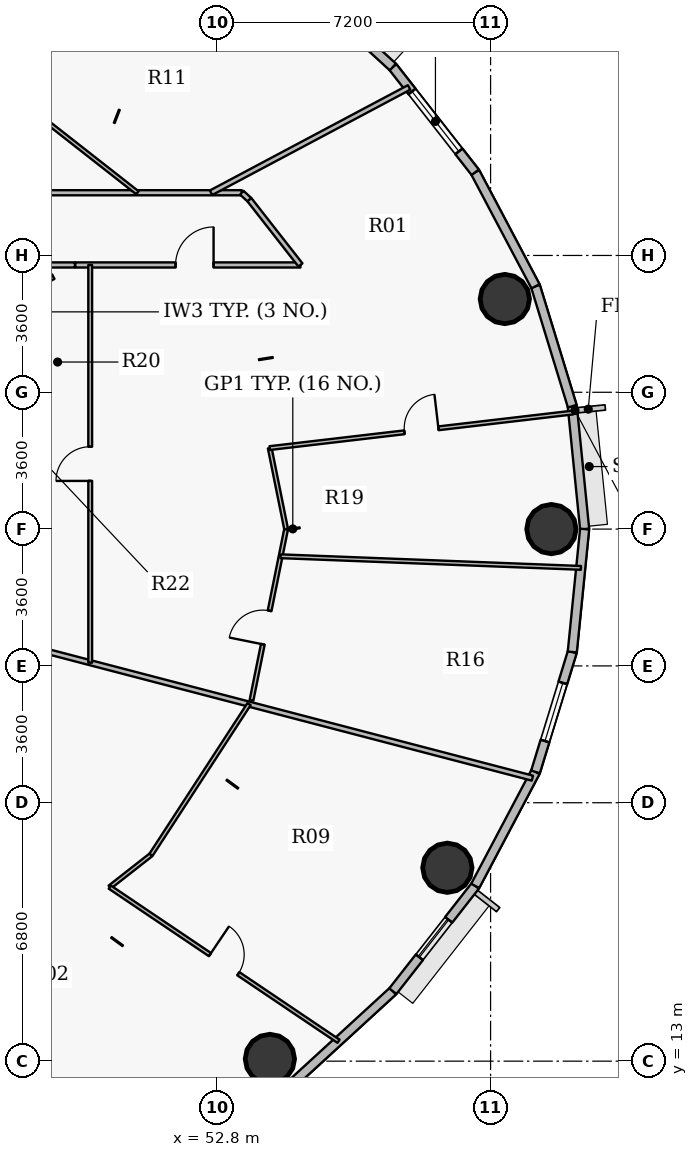
"""IFC4 building model, lengths in metres.
Left out: names, types, materials, properties, quantities, classifications, styles, units other than length and angle.
Written with IfcOpenShell. Run it as: python <this file> out.ifc"""

import sys

from ifc_helpers import new_model, si_unit, direction, frame, frame_2d, origin, origin_2d, place, context, subcontext, project, spatial, rectangle, hollow_circle, extrude, source, transform, mapped, element, fill, save


model = new_model("IFC4")
c1 = context("Model", 3, precision=1e-05, world=origin(), true_north=direction((0.0, 1.0)))
c2 = subcontext(c1, "Body", "Model", "MODEL_VIEW")
j1 = project(units=[si_unit("LENGTHUNIT", "METRE"), si_unit("PLANEANGLEUNIT", "RADIAN")], contexts=[c1])
p1 = place(None, origin())
s1 = spatial("IfcSite", under=j1, at=p1, CompositionType="ELEMENT")
p2 = place(p1, origin())
s2 = spatial("IfcBuilding", under=s1, at=p2, CompositionType="ELEMENT")
p3 = place(p2, frame((0.0, 0.0, 174.9)))
s3 = spatial("IfcBuildingStorey", under=s2, at=p3, CompositionType="ELEMENT", Elevation=174.9)
for number, where, z_axis, x_axis in (
    (1, (61.6, 27.0, 0.0), (0.0, 0.0, 1.0), (1.0, 0.0, 0.0)),
    (2, (60.375, 33.053, 0.0), (0.0, 0.0, 1.0), (1.0, 0.0, 0.0)),
    (3, (54.192, 13.058, 0.0), (0.0, 0.0, 1.0), (1.0, 0.0, 0.0)),
    (4, (58.863, 18.089, 0.0), (0.0, 0.0, 1.0), (1.0, 0.0, 0.0)),
):
    element("IfcColumn", number, at=place(p3, frame(where, z_axis=z_axis, x_axis=x_axis)), inside=s3, PredefinedType="COLUMN", context=c2, shape_type="SweptSolid", body=[
        extrude(hollow_circle(Radius=0.65, WallThickness=0.04, at=origin_2d()), origin(), (0.0, 0.0, 1.0), 3.75),
    ])
p4 = place(p3, frame((62.15, 30.234, 0.0), z_axis=(0.0, 0.0, 1.0), x_axis=(0.100061534614, -0.994981250723, 0.0)))
e5 = element("IfcWall", 5, at=p4, inside=s3, PredefinedType="SOLIDWALL", context=c2, shape_type="SweptSolid", body=[
    extrude(rectangle(XDim=3.25, YDim=0.24, at=frame_2d((1.625, 0.0))), origin(), (0.0, 0.0, 1.0), 3.5),
])
p5 = place(p3, frame((61.183, 33.389, 0.0), z_axis=(0.0, 0.0, 1.0), x_axis=(0.293097995113, -0.956082405058, 0.0)))
e6 = element("IfcWall", 6, at=p5, inside=s3, PredefinedType="SOLIDWALL", context=c2, shape_type="SweptSolid", body=[
    extrude(rectangle(XDim=3.3, YDim=0.24, at=frame_2d((1.65, 0.0))), origin(), (0.0, 0.0, 1.0), 3.5),
])
p6 = place(p3, frame((59.596, 36.388, 0.0), z_axis=(0.0, 0.0, 1.0), x_axis=(0.467586874938, -0.88394712194, 0.0)))
e7 = element("IfcWall", 7, at=p6, inside=s3, PredefinedType="SOLIDWALL", context=c2, shape_type="SweptSolid", body=[
    extrude(rectangle(XDim=3.393, YDim=0.24, at=frame_2d((1.697, 0.0))), origin(), (0.0, 0.0, 1.0), 3.5),
])
p7 = place(p3, frame((57.428, 39.158, 0.0), z_axis=(0.0, 0.0, 1.0), x_axis=(0.616287674549, -0.787521112224, 0.0)))
e8 = element("IfcWall", 8, at=p7, inside=s3, PredefinedType="SOLIDWALL", context=c2, shape_type="SweptSolid", body=[
    extrude(rectangle(XDim=3.517, YDim=0.24, at=frame_2d((1.759, 0.0))), origin(), (0.0, 0.0, 1.0), 3.5),
])
p8 = place(p7, frame((0.819, 0.0, 0.9)))
e9 = element("IfcOpeningElement", 9, at=p8, cuts=e8, PredefinedType="OPENING", context=c2, shape_type="SweptSolid", body=[
    extrude(rectangle(XDim=2.0, YDim=1.75, at=origin_2d()), frame((1.0, 0.13, 0.875), z_axis=(0.0, -1.0, 0.0), x_axis=(1.0, 0.0, 0.0)), (0.0, 0.0, 1.0), 0.26),
])
for number, where, z_axis, x_axis in (
    (10, (54.732, 41.631, 0.0), (0.0, 0.0, 1.0), (0.737, -0.676, 0.0)),
    (11, (57.428, 14.842, 0.0), (0.0, 0.0, 1.0), (-0.737, -0.676, 0.0)),
):
    element("IfcWall", number, at=place(p3, frame(where, z_axis=z_axis, x_axis=x_axis)), inside=s3, PredefinedType="SOLIDWALL", context=c2, shape_type="SweptSolid", body=[
        extrude(rectangle(XDim=3.658, YDim=0.24, at=frame_2d((1.829, 0.0))), origin(), (0.0, 0.0, 1.0), 3.5),
    ])
p9 = place(p3, frame((59.596, 17.612, 0.0), z_axis=(0.0, 0.0, 1.0), x_axis=(-0.616287674549, -0.787521112224, 0.0)))
e12 = element("IfcWall", 12, at=p9, inside=s3, PredefinedType="SOLIDWALL", context=c2, shape_type="SweptSolid", body=[
    extrude(rectangle(XDim=3.517, YDim=0.24, at=frame_2d((1.759, 0.0))), origin(), (0.0, 0.0, 1.0), 3.5),
])
p10 = place(p9, frame((1.134, 0.0, 0.9)))
e13 = element("IfcOpeningElement", 13, at=p10, cuts=e12, PredefinedType="OPENING", context=c2, shape_type="SweptSolid", body=[
    extrude(rectangle(XDim=1.25, YDim=1.65, at=origin_2d()), frame((0.625, 0.13, 0.825), z_axis=(0.0, -1.0, 0.0), x_axis=(1.0, 0.0, 0.0)), (0.0, 0.0, 1.0), 0.26),
])
p11 = place(p3, frame((61.183, 20.611, 0.0), z_axis=(0.0, 0.0, 1.0), x_axis=(-0.467586874938, -0.88394712194, 0.0)))
e14 = element("IfcWall", 14, at=p11, inside=s3, PredefinedType="SOLIDWALL", context=c2, shape_type="SweptSolid", body=[
    extrude(rectangle(XDim=3.393, YDim=0.24, at=frame_2d((1.697, 0.0))), origin(), (0.0, 0.0, 1.0), 3.5),
])
p12 = place(p3, frame((62.15, 23.766, 0.0), z_axis=(0.0, 0.0, 1.0), x_axis=(-0.293097995113, -0.956082405058, 0.0)))
e15 = element("IfcWall", 15, at=p12, inside=s3, PredefinedType="SOLIDWALL", context=c2, shape_type="SweptSolid", body=[
    extrude(rectangle(XDim=3.3, YDim=0.24, at=frame_2d((1.65, 0.0))), origin(), (0.0, 0.0, 1.0), 3.5),
])
p13 = place(p12, frame((0.85, 0.0, 0.9)))
e16 = element("IfcOpeningElement", 16, at=p13, cuts=e15, PredefinedType="OPENING", context=c2, shape_type="SweptSolid", body=[
    extrude(rectangle(XDim=1.6, YDim=1.75, at=origin_2d()), frame((0.8, 0.13, 0.875), z_axis=(0.0, -1.0, 0.0), x_axis=(1.0, 0.0, 0.0)), (0.0, 0.0, 1.0), 0.26),
])
p14 = place(p3, frame((62.475, 27.0, 0.0), z_axis=(0.0, 0.0, 1.0), x_axis=(-0.100061534614, -0.994981250723, 0.0)))
e17 = element("IfcWall", 17, at=p14, inside=s3, PredefinedType="SOLIDWALL", context=c2, shape_type="SweptSolid", body=[
    extrude(rectangle(XDim=3.25, YDim=0.24, at=frame_2d((1.625, 0.0))), origin(), (0.0, 0.0, 1.0), 3.5),
])
p15 = place(p3, frame((38.541, 35.85, 0.0), z_axis=(0.0, 0.0, 1.0), x_axis=(1.0, 0.0, 0.0)))
e18 = element("IfcWall", 18, at=p15, inside=s3, PredefinedType="PARTITIONING", context=c2, shape_type="SweptSolid", body=[
    extrude(rectangle(XDim=14.913, YDim=0.135, at=frame_2d((7.456, 0.0))), origin(), (0.0, 0.0, 1.0), 2.935),
])
p16 = place(p15, frame((5.868, 0.0, 0.0)))
e19 = element("IfcOpeningElement", 19, at=p16, cuts=e18, PredefinedType="OPENING", context=c2, shape_type="SweptSolid", body=[
    extrude(rectangle(XDim=1.0, YDim=2.15, at=origin_2d()), frame((0.5, 0.078, 1.075), z_axis=(0.0, -1.0, 0.0), x_axis=(1.0, 0.0, 0.0)), (0.0, 0.0, 1.0), 0.155),
])
p17 = place(p3, frame((45.282, 14.54, 0.0), z_axis=(0.0, 0.0, 1.0), x_axis=(0.597407497301, -0.801937829366, 0.0)))
e20 = element("IfcWall", 20, at=p17, inside=s3, PredefinedType="PARTITIONING", context=c2, shape_type="SweptSolid", body=[
    extrude(rectangle(XDim=6.713, YDim=0.1, at=frame_2d((3.356, 0.0))), origin(), (0.0, 0.0, 1.0), 2.935),
])
p18 = place(p17, frame((2.906, 0.0, 0.0)))
e21 = element("IfcOpeningElement", 21, at=p18, cuts=e20, PredefinedType="OPENING", context=c2, shape_type="SweptSolid", body=[
    extrude(rectangle(XDim=0.9, YDim=2.1, at=origin_2d()), frame((0.45, 0.06, 1.05), z_axis=(0.0, -1.0, 0.0), x_axis=(1.0, 0.0, 0.0)), (0.0, 0.0, 1.0), 0.12),
])
p19 = place(p3, frame((46.346, 39.035, 0.0), z_axis=(0.0, 0.0, 1.0), x_axis=(0.651891052095, 0.758312637504, 0.0)))
e22 = element("IfcWall", 22, at=p19, inside=s3, PredefinedType="PARTITIONING", context=c2, shape_type="SweptSolid", body=[
    extrude(rectangle(XDim=6.742, YDim=0.1, at=frame_2d((3.371, 0.0))), origin(), (0.0, 0.0, 1.0), 2.935),
])
p20 = place(p19, frame((2.921, 0.0, 0.0)))
e23 = element("IfcOpeningElement", 23, at=p20, cuts=e22, PredefinedType="OPENING", context=c2, shape_type="SweptSolid", body=[
    extrude(rectangle(XDim=0.9, YDim=2.1, at=origin_2d()), frame((0.45, 0.06, 1.05), z_axis=(0.0, -1.0, 0.0), x_axis=(1.0, 0.0, 0.0)), (0.0, 0.0, 1.0), 0.12),
])
p21 = place(p3, frame((46.945, 38.796, 0.0), z_axis=(0.0, 0.0, 1.0), x_axis=(0.787326008068, -0.616536906454, 0.0)))
e24 = element("IfcWall", 24, at=p21, inside=s3, PredefinedType="PARTITIONING", context=c2, shape_type="SweptSolid", body=[
    extrude(rectangle(XDim=4.779, YDim=0.1, at=frame_2d((2.389, 0.0))), origin(), (0.0, 0.0, 1.0), 2.935),
])
p22 = place(p3, frame((47.09, 24.105, 0.0), z_axis=(0.0, 0.0, 1.0), x_axis=(0.967573213792, -0.252590728159, 0.0)))
e25 = element("IfcWall", 25, at=p22, inside=s3, PredefinedType="PARTITIONING", context=c2, shape_type="SweptSolid", body=[
    extrude(rectangle(XDim=14.481, YDim=0.135, at=frame_2d((7.24, 0.0))), origin(), (0.0, 0.0, 1.0), 2.935),
])
p23 = place(p3, frame((49.071, 33.95, 0.0), z_axis=(0.0, 0.0, 1.0), x_axis=(1.0, 0.0, 0.0)))
e26 = element("IfcWall", 26, at=p23, inside=s3, PredefinedType="PARTITIONING", context=c2, shape_type="SweptSolid", body=[
    extrude(rectangle(XDim=5.926, YDim=0.135, at=frame_2d((2.963, 0.0))), origin(), (0.0, 0.0, 1.0), 3.5),
])
p24 = place(p23, frame((2.64, 0.0, 0.0)))
e27 = element("IfcOpeningElement", 27, at=p24, cuts=e26, PredefinedType="OPENING", context=c2, shape_type="SweptSolid", body=[
    extrude(rectangle(XDim=1.0, YDim=2.15, at=origin_2d()), frame((0.5, 0.078, 1.075), z_axis=(0.0, -1.0, 0.0), x_axis=(1.0, 0.0, 0.0)), (0.0, 0.0, 1.0), 0.155),
])
p25 = place(p3, frame((49.464, 23.485, 0.0), z_axis=(0.0, 0.0, 1.0), x_axis=(0.0, 1.0, 0.0)))
e28 = element("IfcWall", 28, at=p25, inside=s3, PredefinedType="PARTITIONING", context=c2, shape_type="SweptSolid", body=[
    extrude(rectangle(XDim=10.465, YDim=0.1, at=frame_2d((5.232, 0.0))), origin(), (0.0, 0.0, 1.0), 2.935),
])
p26 = place(p25, frame((4.783, 0.0, 0.0)))
e29 = element("IfcOpeningElement", 29, at=p26, cuts=e28, PredefinedType="OPENING", context=c2, shape_type="SweptSolid", body=[
    extrude(rectangle(XDim=0.9, YDim=2.1, at=origin_2d()), frame((0.45, 0.06, 1.05), z_axis=(0.0, -1.0, 0.0), x_axis=(1.0, 0.0, 0.0)), (0.0, 0.0, 1.0), 0.12),
])
p27 = place(p3, frame((49.979, 17.58, 0.0), z_axis=(0.0, 0.0, 1.0), x_axis=(0.787344176355, 0.6165137046, 0.0)))
e30 = element("IfcWall", 30, at=p27, inside=s3, PredefinedType="PARTITIONING", context=c2, shape_type="SweptSolid", body=[
    extrude(rectangle(XDim=1.378, YDim=0.1, at=frame_2d((0.689, 0.0))), origin(), (0.0, 0.0, 1.0), 3.5),
])
p28 = place(p3, frame((49.979, 17.58, 0.0), z_axis=(0.0, 0.0, 1.0), x_axis=(0.829313188428, -0.55878406876, 0.0)))
e31 = element("IfcWall", 31, at=p28, inside=s3, PredefinedType="PARTITIONING", context=c2, shape_type="SweptSolid", body=[
    extrude(rectangle(XDim=7.259, YDim=0.1, at=frame_2d((3.629, 0.0))), origin(), (0.0, 0.0, 1.0), 2.935),
])
p29 = place(p28, frame((3.179, 0.0, 0.0)))
e32 = element("IfcOpeningElement", 32, at=p29, cuts=e31, PredefinedType="OPENING", context=c2, shape_type="SweptSolid", body=[
    extrude(rectangle(XDim=0.9, YDim=2.1, at=origin_2d()), frame((0.45, 0.06, 1.05), z_axis=(0.0, -1.0, 0.0), x_axis=(1.0, 0.0, 0.0)), (0.0, 0.0, 1.0), 0.12),
])
p30 = place(p3, frame((51.064, 18.429, 0.0), z_axis=(0.0, 0.0, 1.0), x_axis=(0.545362062942, 0.838200584767, 0.0)))
e33 = element("IfcWall", 33, at=p30, inside=s3, PredefinedType="PARTITIONING", context=c2, shape_type="SweptSolid", body=[
    extrude(rectangle(XDim=4.729, YDim=0.1, at=frame_2d((2.365, 0.0))), origin(), (0.0, 0.0, 1.0), 2.935),
])
p31 = place(p3, frame((52.645, 35.85, 0.0), z_axis=(0.0, 0.0, 1.0), x_axis=(0.882944268091, 0.469477815712, 0.0)))
e34 = element("IfcWall", 34, at=p31, inside=s3, PredefinedType="PARTITIONING", context=c2, shape_type="SweptSolid", body=[
    extrude(rectangle(XDim=5.902, YDim=0.135, at=frame_2d((2.951, 0.0))), origin(), (0.0, 0.0, 1.0), 2.935),
])
p32 = place(p3, frame((53.454, 35.85, 0.0), z_axis=(0.0, 0.0, 1.0), x_axis=(0.736667385572, -0.676255249913, 0.0)))
e35 = element("IfcWall", 35, at=p32, inside=s3, PredefinedType="PARTITIONING", context=c2, shape_type="SweptSolid", body=[
    extrude(rectangle(XDim=0.271, YDim=0.135, at=frame_2d((0.135, 0.0))), origin(), (0.0, 0.0, 1.0), 3.5),
])
p33 = place(p3, frame((53.653, 35.667, 0.0), z_axis=(0.0, 0.0, 1.0), x_axis=(0.616302223209, -0.787509726713, 0.0)))
e36 = element("IfcWall", 36, at=p33, inside=s3, PredefinedType="PARTITIONING", context=c2, shape_type="SweptSolid", body=[
    extrude(rectangle(XDim=2.18, YDim=0.135, at=frame_2d((1.09, 0.0))), origin(), (0.0, 0.0, 1.0), 3.5),
])
p34 = place(p3, frame((53.709, 22.494, 0.0), z_axis=(0.0, 0.0, 1.0), x_axis=(0.198239863178, 0.980153537282, 0.0)))
e37 = element("IfcWall", 37, at=p34, inside=s3, PredefinedType="PARTITIONING", context=c2, shape_type="SweptSolid", body=[
    extrude(rectangle(XDim=4.597, YDim=0.1, at=frame_2d((2.299, 0.0))), origin(), (0.0, 0.0, 1.0), 2.935),
])
p35 = place(p34, frame((1.504, 0.0, 0.0)))
e38 = element("IfcOpeningElement", 38, at=p35, cuts=e37, PredefinedType="OPENING", context=c2, shape_type="SweptSolid", body=[
    extrude(rectangle(XDim=0.9, YDim=2.1, at=origin_2d()), frame((0.45, 0.06, 1.05), z_axis=(0.0, -1.0, 0.0), x_axis=(1.0, 0.0, 0.0)), (0.0, 0.0, 1.0), 0.12),
])
p36 = place(p3, frame((54.189, 29.132, 0.0), z_axis=(0.0, 0.0, 1.0), x_axis=(0.198252946245, -0.98015089109, 0.0)))
e39 = element("IfcWall", 39, at=p36, inside=s3, PredefinedType="PARTITIONING", context=c2, shape_type="SweptSolid", body=[
    extrude(rectangle(XDim=2.175, YDim=0.1, at=frame_2d((1.087, 0.0))), origin(), (0.0, 0.0, 1.0), 2.935),
])
p37 = place(p3, frame((54.189, 29.132, 0.0), z_axis=(0.0, 0.0, 1.0), x_axis=(0.993202342674, 0.116400629328, 0.0)))
e40 = element("IfcWall", 40, at=p37, inside=s3, PredefinedType="PARTITIONING", context=c2, shape_type="SweptSolid", body=[
    extrude(rectangle(XDim=8.037, YDim=0.1, at=frame_2d((4.019, 0.0))), origin(), (0.0, 0.0, 1.0), 2.935),
])
p38 = place(p37, frame((3.569, 0.0, 0.0)))
e41 = element("IfcOpeningElement", 41, at=p38, cuts=e40, PredefinedType="OPENING", context=c2, shape_type="SweptSolid", body=[
    extrude(rectangle(XDim=0.9, YDim=2.1, at=origin_2d()), frame((0.45, 0.06, 1.05), z_axis=(0.0, -1.0, 0.0), x_axis=(1.0, 0.0, 0.0)), (0.0, 0.0, 1.0), 0.12),
])
p39 = place(p3, frame((54.475, 26.285, 0.0), z_axis=(0.0, 0.0, 1.0), x_axis=(0.999251521297, -0.03868329336, 0.0)))
e42 = element("IfcWall", 42, at=p39, inside=s3, PredefinedType="PARTITIONING", context=c2, shape_type="SweptSolid", body=[
    extrude(rectangle(XDim=7.908, YDim=0.1, at=frame_2d((3.954, 0.0))), origin(), (0.0, 0.0, 1.0), 2.935),
])
p40 = place(p3, frame((49.061, 33.95, 0.0), z_axis=(0.0, 0.0, 1.0), x_axis=(-1.0, 0.0, 0.0)))
e43 = element("IfcWall", 43, at=p40, inside=s3, PredefinedType="PARTITIONING", context=c2, shape_type="SweptSolid", body=[
    extrude(rectangle(XDim=3.261, YDim=0.135, at=frame_2d((1.63, 0.0))), origin(), (0.0, 0.0, 1.0), 3.5),
])
p41 = place(p3, frame((47.749, 33.247, 0.0), z_axis=(0.0, 0.0, 1.0), x_axis=(0.882834022315, 0.469685095616, 0.0)))
e44 = element("IfcWall", 44, at=p41, inside=s3, PredefinedType="PARTITIONING", context=c2, shape_type="SweptSolid", body=[
    extrude(rectangle(XDim=0.842, YDim=0.135, at=frame_2d((0.421, 0.0))), origin(), (0.0, 0.0, 1.0), 3.5),
])
m1 = source(origin(), c2, "Body", "SweptSolid", [
    extrude(rectangle(XDim=2.0, YDim=1.75, at=origin_2d()), frame((1.0, 0.03, 0.875), z_axis=(0.0, -1.0, 0.0), x_axis=(1.0, 0.0, 0.0)), (0.0, 0.0, 1.0), 0.06),
])
p42 = place(p8, origin())
e45 = element("IfcWindow", 45, at=p42, inside=s3, PartitioningType="DOUBLE_PANEL_VERTICAL", PredefinedType="WINDOW", context=c2, shape_type="MappedRepresentation", body=[
    mapped(m1, transform((0.0, 0.0, 0.0), x_axis=(1.0, 0.0, 0.0), y_axis=(0.0, 1.0, 0.0), z_axis=(0.0, 0.0, 1.0), scale=1.0)),
])
fill(e9, e45)
m2 = source(origin(), c2, "Body", "SweptSolid", [
    extrude(rectangle(XDim=1.6, YDim=1.75, at=origin_2d()), frame((0.8, 0.03, 0.875), z_axis=(0.0, -1.0, 0.0), x_axis=(1.0, 0.0, 0.0)), (0.0, 0.0, 1.0), 0.06),
])
p43 = place(p13, origin())
e46 = element("IfcWindow", 46, at=p43, inside=s3, PartitioningType="DOUBLE_PANEL_VERTICAL", PredefinedType="WINDOW", context=c2, shape_type="MappedRepresentation", body=[
    mapped(m2, transform((0.0, 0.0, 0.0), x_axis=(1.0, 0.0, 0.0), y_axis=(0.0, 1.0, 0.0), z_axis=(0.0, 0.0, 1.0), scale=1.0)),
])
fill(e16, e46)
m3 = source(origin(), c2, "Body", "SweptSolid", [
    extrude(rectangle(XDim=1.25, YDim=1.65, at=origin_2d()), frame((0.625, 0.03, 0.825), z_axis=(0.0, -1.0, 0.0), x_axis=(1.0, 0.0, 0.0)), (0.0, 0.0, 1.0), 0.06),
])
p44 = place(p10, origin())
e47 = element("IfcWindow", 47, at=p44, inside=s3, PartitioningType="SINGLE_PANEL", PredefinedType="WINDOW", context=c2, shape_type="MappedRepresentation", body=[
    mapped(m3, transform((0.0, 0.0, 0.0), x_axis=(1.0, 0.0, 0.0), y_axis=(0.0, 1.0, 0.0), z_axis=(0.0, 0.0, 1.0), scale=1.0)),
])
fill(e13, e47)
m4 = source(origin(), c2, "Body", "SweptSolid", [
    extrude(rectangle(XDim=0.9, YDim=2.1, at=origin_2d()), frame((0.45, 0.025, 1.05), z_axis=(0.0, -1.0, 0.0), x_axis=(1.0, 0.0, 0.0)), (0.0, 0.0, 1.0), 0.05),
])
p45 = place(p29, origin())
e48 = element("IfcDoor", 48, at=p45, inside=s3, OperationType="SINGLE_SWING_LEFT", PredefinedType="DOOR", context=c2, shape_type="MappedRepresentation", body=[
    mapped(m4, transform((0.0, 0.0, 0.0), x_axis=(1.0, 0.0, 0.0), y_axis=(0.0, 1.0, 0.0), z_axis=(0.0, 0.0, 1.0), scale=1.0)),
])
fill(e32, e48)
m5 = source(origin(), c2, "Body", "SweptSolid", [
    extrude(rectangle(XDim=1.0, YDim=2.15, at=origin_2d()), frame((0.5, 0.025, 1.075), z_axis=(0.0, -1.0, 0.0), x_axis=(1.0, 0.0, 0.0)), (0.0, 0.0, 1.0), 0.05),
])
p46 = place(p24, origin())
e49 = element("IfcDoor", 49, at=p46, inside=s3, OperationType="SINGLE_SWING_RIGHT", PredefinedType="DOOR", context=c2, shape_type="MappedRepresentation", body=[
    mapped(m5, transform((0.0, 0.0, 0.0), x_axis=(1.0, 0.0, 0.0), y_axis=(0.0, 1.0, 0.0), z_axis=(0.0, 0.0, 1.0), scale=1.0)),
])
fill(e27, e49)
p47 = place(p35, origin())
e50 = element("IfcDoor", 50, at=p47, inside=s3, OperationType="SINGLE_SWING_LEFT", PredefinedType="DOOR", context=c2, shape_type="MappedRepresentation", body=[
    mapped(m4, transform((0.0, 0.0, 0.0), x_axis=(1.0, 0.0, 0.0), y_axis=(0.0, 1.0, 0.0), z_axis=(0.0, 0.0, 1.0), scale=1.0)),
])
fill(e38, e50)
p48 = place(p38, origin())
e51 = element("IfcDoor", 51, at=p48, inside=s3, OperationType="SINGLE_SWING_RIGHT", PredefinedType="DOOR", context=c2, shape_type="MappedRepresentation", body=[
    mapped(m4, transform((0.0, 0.0, 0.0), x_axis=(1.0, 0.0, 0.0), y_axis=(0.0, 1.0, 0.0), z_axis=(0.0, 0.0, 1.0), scale=1.0)),
])
fill(e41, e51)
p49 = place(p26, origin())
e52 = element("IfcDoor", 52, at=p49, inside=s3, OperationType="SINGLE_SWING_LEFT", PredefinedType="DOOR", context=c2, shape_type="MappedRepresentation", body=[
    mapped(m4, transform((0.0, 0.0, 0.0), x_axis=(1.0, 0.0, 0.0), y_axis=(0.0, 1.0, 0.0), z_axis=(0.0, 0.0, 1.0), scale=1.0)),
])
fill(e29, e52)
save(model, sys.argv[1])
